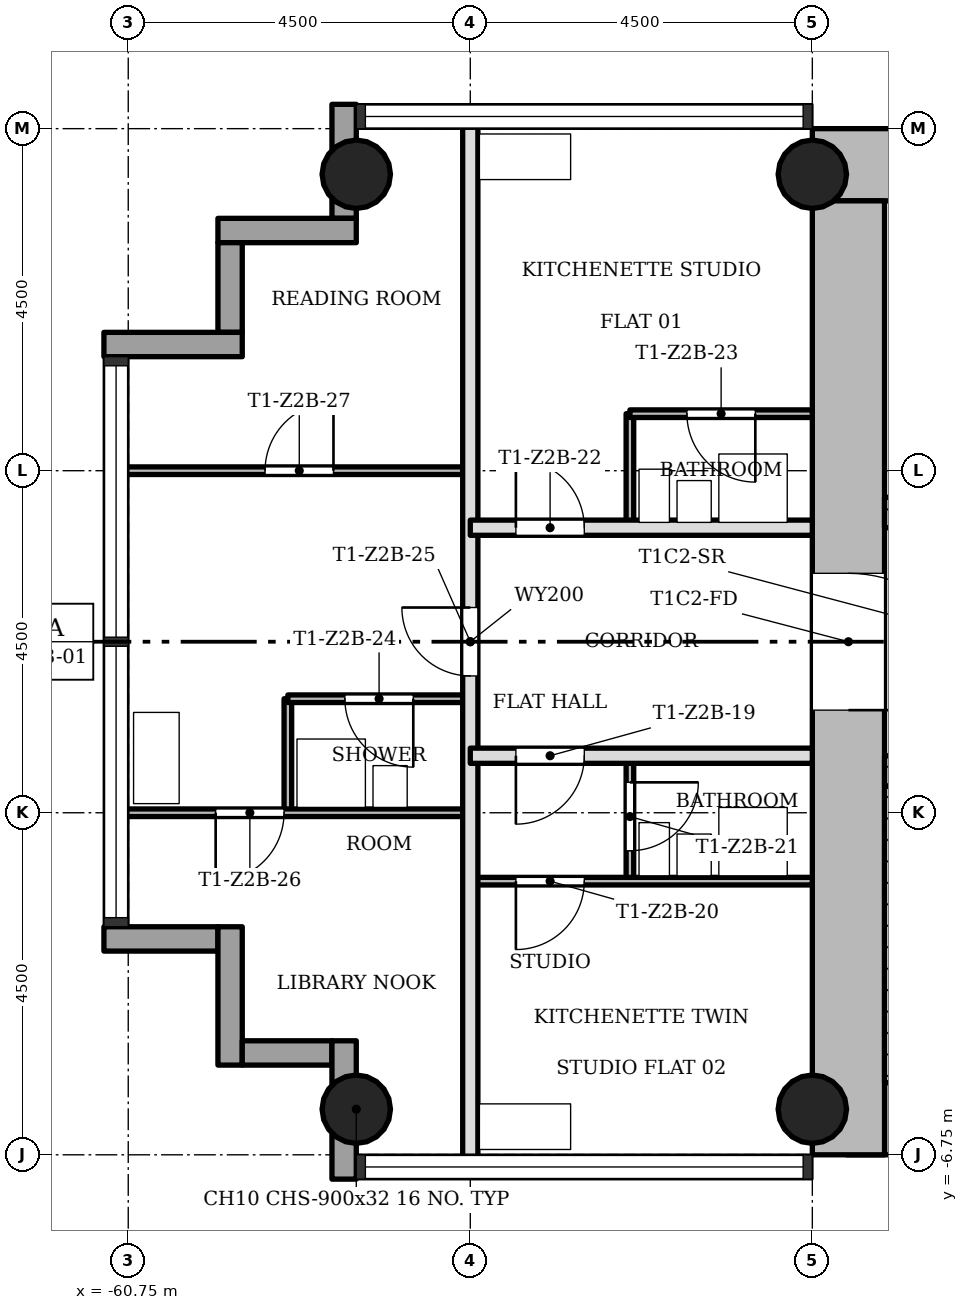
"""IFC4 building model, lengths in metres.
Left out: names, types, materials, properties, quantities, classifications, styles, units other than length and angle.
Written with IfcOpenShell. Run it as: python <this file> out.ifc"""

import sys

from ifc_helpers import new_model, si_unit, direction, frame, frame_2d, origin, origin_2d, place, context, subcontext, project, spatial, rectangle, hollow_circle, extrude, element, fill, save


model = new_model("IFC4")
c1 = context("Model", 3, precision=1e-05, world=origin(), true_north=direction((0.0, 1.0)))
c2 = subcontext(c1, "Body", "Model", "MODEL_VIEW")
j1 = project(units=[si_unit("LENGTHUNIT", "METRE"), si_unit("PLANEANGLEUNIT", "RADIAN")], contexts=[c1])
p1 = place(None, origin())
s1 = spatial("IfcSite", under=j1, at=p1, CompositionType="ELEMENT")
p2 = place(p1, origin())
s2 = spatial("IfcBuilding", under=s1, at=p2, CompositionType="ELEMENT")
p3 = place(p2, frame((0.0, 0.0, 76.6)))
s3 = spatial("IfcBuildingStorey", under=s2, at=p3, CompositionType="ELEMENT", Elevation=76.6)
p4 = place(p3, frame((-51.298, -6.275, 0.0), z_axis=(0.0, 0.0, 1.0), x_axis=(1.0, 0.0, 0.0)))
e1 = element("IfcWall", 1, at=p4, inside=s3, PredefinedType="SHEAR", context=c2, shape_type="SweptSolid", body=[
    extrude(rectangle(XDim=8.696, YDim=0.95, at=frame_2d((4.348, 0.0))), origin(), (0.0, 0.0, 1.0), 3.4),
])
p5 = place(p3, frame((-43.7, 6.275, 0.0), z_axis=(0.0, 0.0, 1.0), x_axis=(-1.0, 0.0, 0.0)))
e2 = element("IfcWall", 2, at=p5, inside=s3, PredefinedType="SHEAR", context=c2, shape_type="SweptSolid", body=[
    extrude(rectangle(XDim=8.05, YDim=0.95, at=frame_2d((4.025, 0.0))), origin(), (0.0, 0.0, 1.0), 3.4),
])
p6 = place(p3, frame((-51.275, 5.8, 0.0), z_axis=(0.0, 0.0, 1.0), x_axis=(0.0, -1.0, 0.0)))
e3 = element("IfcWall", 3, at=p6, inside=s3, PredefinedType="SHEAR", context=c2, shape_type="SweptSolid", body=[
    extrude(rectangle(XDim=12.55, YDim=0.95, at=frame_2d((6.275, 0.0))), origin(), (0.0, 0.0, 1.0), 3.4),
])
p7 = place(p6, frame((4.9, 0.0, 0.0)))
e4 = element("IfcOpeningElement", 4, at=p7, cuts=e3, PredefinedType="OPENING", context=c2, shape_type="SweptSolid", body=[
    extrude(rectangle(XDim=1.8, YDim=2.1, at=frame_2d((0.9, 1.05))), frame((0.0, 0.485, 0.0), z_axis=(0.0, -1.0, 0.0), x_axis=(1.0, 0.0, 0.0)), (0.0, 0.0, 1.0), 0.97),
])
p8 = place(p3, frame((-50.8, -1.7, 0.0), z_axis=(0.0, 0.0, 1.0), x_axis=(1.0, 0.0, 0.0)))
e5 = element("IfcWall", 5, at=p8, inside=s3, PredefinedType="SHEAR", context=c2, shape_type="SweptSolid", body=[
    extrude(rectangle(XDim=7.1, YDim=0.4, at=frame_2d((3.55, 0.0))), origin(), (0.0, 0.0, 1.0), 3.4),
])
p9 = place(p8, frame((5.5, 0.0, 0.0)))
e6 = element("IfcOpeningElement", 6, at=p9, cuts=e5, PredefinedType="OPENING", context=c2, shape_type="SweptSolid", body=[
    extrude(rectangle(XDim=0.9, YDim=2.1, at=frame_2d((0.45, 1.05))), frame((0.0, 0.21, 0.0), z_axis=(0.0, -1.0, 0.0), x_axis=(1.0, 0.0, 0.0)), (0.0, 0.0, 1.0), 0.42),
])
p10 = place(p3, frame((-50.8, 1.7, 0.0), z_axis=(0.0, 0.0, 1.0), x_axis=(1.0, 0.0, 0.0)))
e7 = element("IfcWall", 7, at=p10, inside=s3, PredefinedType="SHEAR", context=c2, shape_type="SweptSolid", body=[
    extrude(rectangle(XDim=7.1, YDim=0.4, at=frame_2d((3.55, 0.0))), origin(), (0.0, 0.0, 1.0), 3.4),
])
p11 = place(p10, frame((5.2, 0.0, 0.0)))
e8 = element("IfcOpeningElement", 8, at=p11, cuts=e7, PredefinedType="OPENING", context=c2, shape_type="SweptSolid", body=[
    extrude(rectangle(XDim=1.1, YDim=2.1, at=frame_2d((0.55, 1.05))), frame((0.0, 0.21, 0.0), z_axis=(0.0, -1.0, 0.0), x_axis=(1.0, 0.0, 0.0)), (0.0, 0.0, 1.0), 0.42),
])
for number, where, z_axis, x_axis in (
    (9, (-51.75, -6.15, 0.0), (0.0, 0.0, 1.0), (1.0, 0.0, 0.0)),
    (10, (-51.75, 6.15, 0.0), (0.0, 0.0, 1.0), (1.0, 0.0, 0.0)),
    (11, (-57.75, -6.15, 0.0), (0.0, 0.0, 1.0), (1.0, 0.0, 0.0)),
    (12, (-57.75, 6.15, 0.0), (0.0, 0.0, 1.0), (1.0, 0.0, 0.0)),
):
    element("IfcColumn", number, at=place(p3, frame(where, z_axis=z_axis, x_axis=x_axis)), inside=s3, PredefinedType="COLUMN", context=c2, shape_type="SweptSolid", body=[
        extrude(hollow_circle(Radius=0.45, WallThickness=0.032, at=origin_2d()), origin(), (0.0, 0.0, 1.0), 3.4),
    ])
p12 = place(p3, frame((-61.07, -3.91, -0.3), z_axis=(0.0, 0.0, 1.0), x_axis=(1.0, 0.0, 0.0)))
e13 = element("IfcWall", 13, at=p12, inside=s3, PredefinedType="STANDARD", context=c2, shape_type="SweptSolid", body=[
    extrude(rectangle(XDim=1.5, YDim=0.32, at=frame_2d((0.75, 0.0))), origin(), (0.0, 0.0, 1.0), 3.4),
])
p13 = place(p3, frame((-59.41, -3.75, -0.3), z_axis=(0.0, 0.0, 1.0), x_axis=(0.0, -1.0, 0.0)))
e14 = element("IfcWall", 14, at=p13, inside=s3, PredefinedType="STANDARD", context=c2, shape_type="SweptSolid", body=[
    extrude(rectangle(XDim=1.82, YDim=0.32, at=frame_2d((0.91, 0.0))), origin(), (0.0, 0.0, 1.0), 3.4),
])
p14 = place(p3, frame((-59.25, -5.41, -0.3), z_axis=(0.0, 0.0, 1.0), x_axis=(1.0, 0.0, 0.0)))
e15 = element("IfcWall", 15, at=p14, inside=s3, PredefinedType="STANDARD", context=c2, shape_type="SweptSolid", body=[
    extrude(rectangle(XDim=1.18, YDim=0.32, at=frame_2d((0.59, 0.0))), origin(), (0.0, 0.0, 1.0), 3.4),
])
p15 = place(p3, frame((-57.91, -5.25, -0.3), z_axis=(0.0, 0.0, 1.0), x_axis=(0.0, -1.0, 0.0)))
e16 = element("IfcWall", 16, at=p15, inside=s3, PredefinedType="STANDARD", context=c2, shape_type="SweptSolid", body=[
    extrude(rectangle(XDim=1.82, YDim=0.32, at=frame_2d((0.91, 0.0))), origin(), (0.0, 0.0, 1.0), 3.4),
])
p16 = place(p3, frame((-57.91, 7.07, -0.3), z_axis=(0.0, 0.0, 1.0), x_axis=(0.0, -1.0, 0.0)))
e17 = element("IfcWall", 17, at=p16, inside=s3, PredefinedType="STANDARD", context=c2, shape_type="SweptSolid", body=[
    extrude(rectangle(XDim=1.5, YDim=0.32, at=frame_2d((0.75, 0.0))), origin(), (0.0, 0.0, 1.0), 3.4),
])
p17 = place(p3, frame((-57.75, 5.41, -0.3), z_axis=(0.0, 0.0, 1.0), x_axis=(-1.0, 0.0, 0.0)))
e18 = element("IfcWall", 18, at=p17, inside=s3, PredefinedType="STANDARD", context=c2, shape_type="SweptSolid", body=[
    extrude(rectangle(XDim=1.82, YDim=0.32, at=frame_2d((0.91, 0.0))), origin(), (0.0, 0.0, 1.0), 3.4),
])
p18 = place(p3, frame((-59.41, 5.25, -0.3), z_axis=(0.0, 0.0, 1.0), x_axis=(0.0, -1.0, 0.0)))
e19 = element("IfcWall", 19, at=p18, inside=s3, PredefinedType="STANDARD", context=c2, shape_type="SweptSolid", body=[
    extrude(rectangle(XDim=1.18, YDim=0.32, at=frame_2d((0.59, 0.0))), origin(), (0.0, 0.0, 1.0), 3.4),
])
p19 = place(p3, frame((-59.25, 3.91, -0.3), z_axis=(0.0, 0.0, 1.0), x_axis=(-1.0, 0.0, 0.0)))
e20 = element("IfcWall", 20, at=p19, inside=s3, PredefinedType="STANDARD", context=c2, shape_type="SweptSolid", body=[
    extrude(rectangle(XDim=1.82, YDim=0.32, at=frame_2d((0.91, 0.0))), origin(), (0.0, 0.0, 1.0), 3.4),
])
p20 = place(p3, frame((-58.65, -2.25, 0.0), z_axis=(0.0, 0.0, 1.0), x_axis=(0.0, 1.0, 0.0)))
e21 = element("IfcWall", 21, at=p20, inside=s3, PredefinedType="PARTITIONING", context=c2, shape_type="SweptSolid", body=[
    extrude(rectangle(XDim=1.5, YDim=0.1, at=frame_2d((0.75, 0.0))), origin(), (0.0, 0.0, 1.0), 3.0),
])
p21 = place(p3, frame((-56.25, -6.85, 0.0), z_axis=(0.0, 0.0, 1.0), x_axis=(0.0, 1.0, 0.0)))
e22 = element("IfcWall", 22, at=p21, inside=s3, PredefinedType="SOLIDWALL", context=c2, shape_type="SweptSolid", body=[
    extrude(rectangle(XDim=13.7, YDim=0.2, at=frame_2d((6.85, 0.0))), origin(), (0.0, 0.0, 1.0), 3.0),
])
p22 = place(p21, frame((6.4, 0.0, 0.0)))
e23 = element("IfcOpeningElement", 23, at=p22, cuts=e22, PredefinedType="OPENING", context=c2, shape_type="SweptSolid", body=[
    extrude(rectangle(XDim=0.9, YDim=2.1, at=frame_2d((0.45, 1.05))), frame((0.0, 0.11, 0.0), z_axis=(0.0, -1.0, 0.0), x_axis=(1.0, 0.0, 0.0)), (0.0, 0.0, 1.0), 0.22),
])
p23 = place(p3, frame((-54.15, -3.15, 0.0), z_axis=(0.0, 0.0, 1.0), x_axis=(0.0, 1.0, 0.0)))
e24 = element("IfcWall", 24, at=p23, inside=s3, PredefinedType="PARTITIONING", context=c2, shape_type="SweptSolid", body=[
    extrude(rectangle(XDim=1.65, YDim=0.1, at=frame_2d((0.825, 0.0))), origin(), (0.0, 0.0, 1.0), 3.0),
])
p24 = place(p23, frame((0.4, 0.0, 0.0)))
e25 = element("IfcOpeningElement", 25, at=p24, cuts=e24, PredefinedType="OPENING", context=c2, shape_type="SweptSolid", body=[
    extrude(rectangle(XDim=0.9, YDim=2.1, at=frame_2d((0.45, 1.05))), frame((0.0, 0.06, 0.0), z_axis=(0.0, -1.0, 0.0), x_axis=(1.0, 0.0, 0.0)), (0.0, 0.0, 1.0), 0.12),
])
p25 = place(p3, frame((-54.15, 1.5, 0.0), z_axis=(0.0, 0.0, 1.0), x_axis=(0.0, 1.0, 0.0)))
e26 = element("IfcWall", 26, at=p25, inside=s3, PredefinedType="PARTITIONING", context=c2, shape_type="SweptSolid", body=[
    extrude(rectangle(XDim=1.5, YDim=0.1, at=frame_2d((0.75, 0.0))), origin(), (0.0, 0.0, 1.0), 3.0),
])
p26 = place(p3, frame((-56.25, -3.15, 0.0), z_axis=(0.0, 0.0, 1.0), x_axis=(1.0, 0.0, 0.0)))
e27 = element("IfcWall", 27, at=p26, inside=s3, PredefinedType="PARTITIONING", context=c2, shape_type="SweptSolid", body=[
    extrude(rectangle(XDim=4.5, YDim=0.1, at=frame_2d((2.25, 0.0))), origin(), (0.0, 0.0, 1.0), 3.0),
])
p27 = place(p26, frame((0.6, 0.0, 0.0)))
e28 = element("IfcOpeningElement", 28, at=p27, cuts=e27, PredefinedType="OPENING", context=c2, shape_type="SweptSolid", body=[
    extrude(rectangle(XDim=0.9, YDim=2.1, at=frame_2d((0.45, 1.05))), frame((0.0, 0.06, 0.0), z_axis=(0.0, -1.0, 0.0), x_axis=(1.0, 0.0, 0.0)), (0.0, 0.0, 1.0), 0.12),
])
p28 = place(p3, frame((-60.85, -2.25, 0.0), z_axis=(0.0, 0.0, 1.0), x_axis=(1.0, 0.0, 0.0)))
e29 = element("IfcWall", 29, at=p28, inside=s3, PredefinedType="PARTITIONING", context=c2, shape_type="SweptSolid", body=[
    extrude(rectangle(XDim=4.6, YDim=0.1, at=frame_2d((2.3, 0.0))), origin(), (0.0, 0.0, 1.0), 3.0),
])
p29 = place(p28, frame((1.25, 0.0, 0.0)))
e30 = element("IfcOpeningElement", 30, at=p29, cuts=e29, PredefinedType="OPENING", context=c2, shape_type="SweptSolid", body=[
    extrude(rectangle(XDim=0.9, YDim=2.1, at=frame_2d((0.45, 1.05))), frame((0.0, 0.06, 0.0), z_axis=(0.0, -1.0, 0.0), x_axis=(1.0, 0.0, 0.0)), (0.0, 0.0, 1.0), 0.12),
])
p30 = place(p3, frame((-56.25, -1.5, 0.0), z_axis=(0.0, 0.0, 1.0), x_axis=(1.0, 0.0, 0.0)))
e31 = element("IfcWall", 31, at=p30, inside=s3, PredefinedType="SOLIDWALL", context=c2, shape_type="SweptSolid", body=[
    extrude(rectangle(XDim=4.5, YDim=0.2, at=frame_2d((2.25, 0.0))), origin(), (0.0, 0.0, 1.0), 3.0),
])
p31 = place(p30, frame((0.6, 0.0, 0.0)))
e32 = element("IfcOpeningElement", 32, at=p31, cuts=e31, PredefinedType="OPENING", context=c2, shape_type="SweptSolid", body=[
    extrude(rectangle(XDim=0.9, YDim=2.1, at=frame_2d((0.45, 1.05))), frame((0.0, 0.11, 0.0), z_axis=(0.0, -1.0, 0.0), x_axis=(1.0, 0.0, 0.0)), (0.0, 0.0, 1.0), 0.22),
])
p32 = place(p3, frame((-58.65, -0.75, 0.0), z_axis=(0.0, 0.0, 1.0), x_axis=(1.0, 0.0, 0.0)))
e33 = element("IfcWall", 33, at=p32, inside=s3, PredefinedType="PARTITIONING", context=c2, shape_type="SweptSolid", body=[
    extrude(rectangle(XDim=2.4, YDim=0.1, at=frame_2d((1.2, 0.0))), origin(), (0.0, 0.0, 1.0), 3.0),
])
p33 = place(p32, frame((0.75, 0.0, 0.0)))
e34 = element("IfcOpeningElement", 34, at=p33, cuts=e33, PredefinedType="OPENING", context=c2, shape_type="SweptSolid", body=[
    extrude(rectangle(XDim=0.9, YDim=2.1, at=frame_2d((0.45, 1.05))), frame((0.0, 0.06, 0.0), z_axis=(0.0, -1.0, 0.0), x_axis=(1.0, 0.0, 0.0)), (0.0, 0.0, 1.0), 0.12),
])
p34 = place(p3, frame((-56.25, 1.5, 0.0), z_axis=(0.0, 0.0, 1.0), x_axis=(1.0, 0.0, 0.0)))
e35 = element("IfcWall", 35, at=p34, inside=s3, PredefinedType="SOLIDWALL", context=c2, shape_type="SweptSolid", body=[
    extrude(rectangle(XDim=4.5, YDim=0.2, at=frame_2d((2.25, 0.0))), origin(), (0.0, 0.0, 1.0), 3.0),
])
p35 = place(p34, frame((0.6, 0.0, 0.0)))
e36 = element("IfcOpeningElement", 36, at=p35, cuts=e35, PredefinedType="OPENING", context=c2, shape_type="SweptSolid", body=[
    extrude(rectangle(XDim=0.9, YDim=2.1, at=frame_2d((0.45, 1.05))), frame((0.0, 0.11, 0.0), z_axis=(0.0, -1.0, 0.0), x_axis=(1.0, 0.0, 0.0)), (0.0, 0.0, 1.0), 0.22),
])
p36 = place(p3, frame((-60.85, 2.25, 0.0), z_axis=(0.0, 0.0, 1.0), x_axis=(1.0, 0.0, 0.0)))
e37 = element("IfcWall", 37, at=p36, inside=s3, PredefinedType="PARTITIONING", context=c2, shape_type="SweptSolid", body=[
    extrude(rectangle(XDim=4.6, YDim=0.1, at=frame_2d((2.3, 0.0))), origin(), (0.0, 0.0, 1.0), 3.0),
])
p37 = place(p36, frame((1.9, 0.0, 0.0)))
e38 = element("IfcOpeningElement", 38, at=p37, cuts=e37, PredefinedType="OPENING", context=c2, shape_type="SweptSolid", body=[
    extrude(rectangle(XDim=0.9, YDim=2.1, at=frame_2d((0.45, 1.05))), frame((0.0, 0.06, 0.0), z_axis=(0.0, -1.0, 0.0), x_axis=(1.0, 0.0, 0.0)), (0.0, 0.0, 1.0), 0.12),
])
p38 = place(p3, frame((-54.15, 3.0, 0.0), z_axis=(0.0, 0.0, 1.0), x_axis=(1.0, 0.0, 0.0)))
e39 = element("IfcWall", 39, at=p38, inside=s3, PredefinedType="PARTITIONING", context=c2, shape_type="SweptSolid", body=[
    extrude(rectangle(XDim=2.4, YDim=0.1, at=frame_2d((1.2, 0.0))), origin(), (0.0, 0.0, 1.0), 3.0),
])
p39 = place(p38, frame((0.75, 0.0, 0.0)))
e40 = element("IfcOpeningElement", 40, at=p39, cuts=e39, PredefinedType="OPENING", context=c2, shape_type="SweptSolid", body=[
    extrude(rectangle(XDim=0.9, YDim=2.1, at=frame_2d((0.45, 1.05))), frame((0.0, 0.06, 0.0), z_axis=(0.0, -1.0, 0.0), x_axis=(1.0, 0.0, 0.0)), (0.0, 0.0, 1.0), 0.12),
])
p40 = place(p3, frame((-50.675, -1.9, 0.0), z_axis=(0.0, 0.0, 1.0), x_axis=(0.0, -1.0, 0.0)))
e41 = element("IfcWall", 41, at=p40, inside=s3, PredefinedType="SHEAR", context=c2, shape_type="SweptSolid", body=[
    extrude(rectangle(XDim=3.9, YDim=0.25, at=frame_2d((1.95, 0.0))), origin(), (0.0, 0.0, 1.0), 3.4),
])
p41 = place(p31, origin())
e42 = element("IfcDoor", 42, at=p41, inside=s3, OperationType="SINGLE_SWING_LEFT", PredefinedType="DOOR", context=c2, shape_type="SweptSolid", body=[
    extrude(rectangle(XDim=0.9, YDim=2.1, at=frame_2d((0.45, 1.05))), frame((0.0, 0.025, 0.0), z_axis=(0.0, -1.0, 0.0), x_axis=(1.0, 0.0, 0.0)), (0.0, 0.0, 1.0), 0.05),
])
fill(e32, e42)
p42 = place(p27, origin())
e43 = element("IfcDoor", 43, at=p42, inside=s3, OperationType="SINGLE_SWING_LEFT", PredefinedType="DOOR", context=c2, shape_type="SweptSolid", body=[
    extrude(rectangle(XDim=0.9, YDim=2.1, at=frame_2d((0.45, 1.05))), frame((0.0, 0.025, 0.0), z_axis=(0.0, -1.0, 0.0), x_axis=(1.0, 0.0, 0.0)), (0.0, 0.0, 1.0), 0.05),
])
fill(e28, e43)
p43 = place(p24, origin())
e44 = element("IfcDoor", 44, at=p43, inside=s3, OperationType="SINGLE_SWING_RIGHT", PredefinedType="DOOR", context=c2, shape_type="SweptSolid", body=[
    extrude(rectangle(XDim=0.9, YDim=2.1, at=frame_2d((0.45, 1.05))), frame((0.0, 0.025, 0.0), z_axis=(0.0, -1.0, 0.0), x_axis=(1.0, 0.0, 0.0)), (0.0, 0.0, 1.0), 0.05),
])
fill(e25, e44)
p44 = place(p35, origin())
e45 = element("IfcDoor", 45, at=p44, inside=s3, OperationType="SINGLE_SWING_RIGHT", PredefinedType="DOOR", context=c2, shape_type="SweptSolid", body=[
    extrude(rectangle(XDim=0.9, YDim=2.1, at=frame_2d((0.45, 1.05))), frame((0.0, 0.025, 0.0), z_axis=(0.0, -1.0, 0.0), x_axis=(1.0, 0.0, 0.0)), (0.0, 0.0, 1.0), 0.05),
])
fill(e36, e45)
p45 = place(p39, origin())
e46 = element("IfcDoor", 46, at=p45, inside=s3, OperationType="SINGLE_SWING_RIGHT", PredefinedType="DOOR", context=c2, shape_type="SweptSolid", body=[
    extrude(rectangle(XDim=0.9, YDim=2.1, at=frame_2d((0.45, 1.05))), frame((0.0, 0.025, 0.0), z_axis=(0.0, -1.0, 0.0), x_axis=(1.0, 0.0, 0.0)), (0.0, 0.0, 1.0), 0.05),
])
fill(e40, e46)
p46 = place(p33, origin())
e47 = element("IfcDoor", 47, at=p46, inside=s3, OperationType="SINGLE_SWING_RIGHT", PredefinedType="DOOR", context=c2, shape_type="SweptSolid", body=[
    extrude(rectangle(XDim=0.9, YDim=2.1, at=frame_2d((0.45, 1.05))), frame((0.0, 0.025, 0.0), z_axis=(0.0, -1.0, 0.0), x_axis=(1.0, 0.0, 0.0)), (0.0, 0.0, 1.0), 0.05),
])
fill(e34, e47)
p47 = place(p22, origin())
e48 = element("IfcDoor", 48, at=p47, inside=s3, OperationType="SINGLE_SWING_LEFT", PredefinedType="DOOR", context=c2, shape_type="SweptSolid", body=[
    extrude(rectangle(XDim=0.9, YDim=2.1, at=frame_2d((0.45, 1.05))), frame((0.0, 0.025, 0.0), z_axis=(0.0, -1.0, 0.0), x_axis=(1.0, 0.0, 0.0)), (0.0, 0.0, 1.0), 0.05),
])
fill(e23, e48)
p48 = place(p29, origin())
e49 = element("IfcDoor", 49, at=p48, inside=s3, OperationType="SINGLE_SWING_LEFT", PredefinedType="DOOR", context=c2, shape_type="SweptSolid", body=[
    extrude(rectangle(XDim=0.9, YDim=2.1, at=frame_2d((0.45, 1.05))), frame((0.0, 0.025, 0.0), z_axis=(0.0, -1.0, 0.0), x_axis=(1.0, 0.0, 0.0)), (0.0, 0.0, 1.0), 0.05),
])
fill(e30, e49)
p49 = place(p37, origin())
e50 = element("IfcDoor", 50, at=p49, inside=s3, OperationType="SINGLE_SWING_LEFT", PredefinedType="DOOR", context=c2, shape_type="SweptSolid", body=[
    extrude(rectangle(XDim=0.9, YDim=2.1, at=frame_2d((0.45, 1.05))), frame((0.0, 0.025, 0.0), z_axis=(0.0, -1.0, 0.0), x_axis=(1.0, 0.0, 0.0)), (0.0, 0.0, 1.0), 0.05),
])
fill(e38, e50)
p50 = place(p7, origin())
e51 = element("IfcDoor", 51, at=p50, inside=s3, OperationType="SINGLE_SWING_LEFT", PredefinedType="DOOR", context=c2, shape_type="SweptSolid", body=[
    extrude(rectangle(XDim=1.8, YDim=2.1, at=frame_2d((0.9, 1.05))), frame((0.0, 0.025, 0.0), z_axis=(0.0, -1.0, 0.0), x_axis=(1.0, 0.0, 0.0)), (0.0, 0.0, 1.0), 0.05),
])
fill(e4, e51)
save(model, sys.argv[1])
